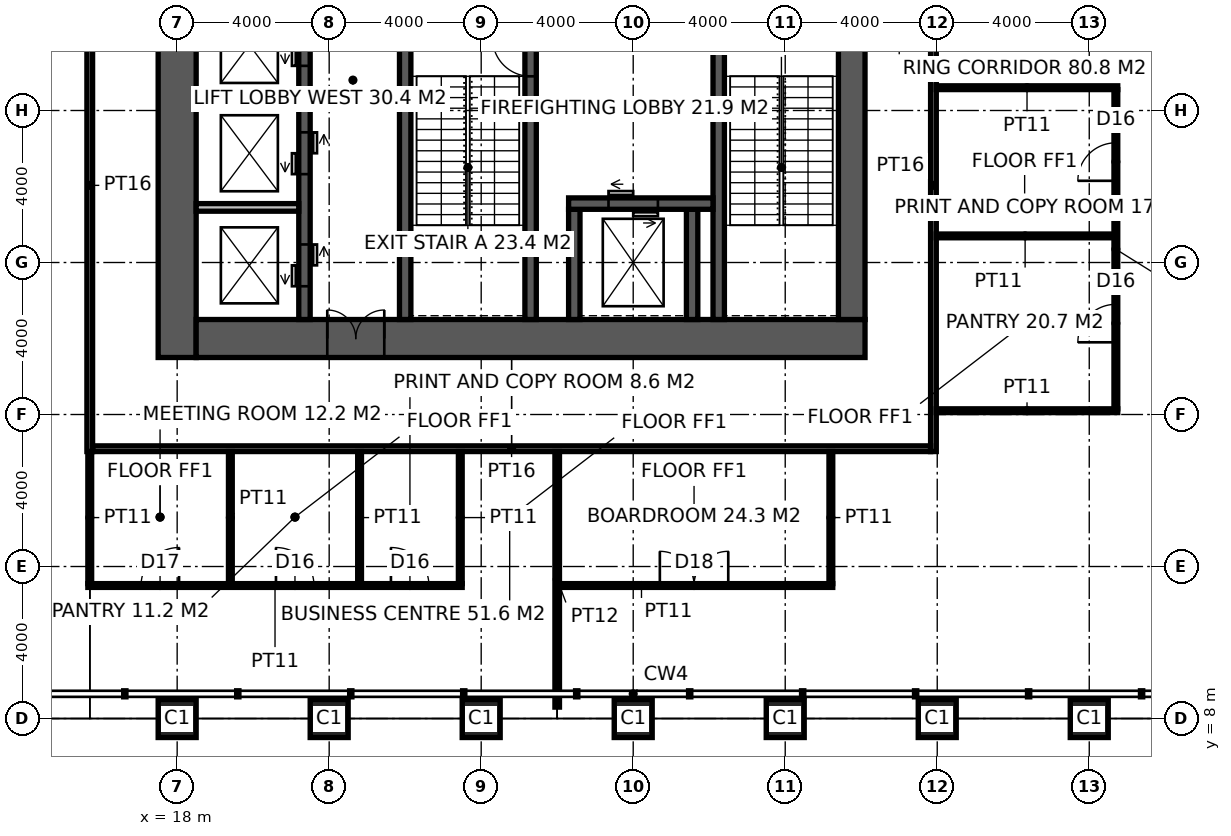
"""IFC4 building model, lengths in metres.
Left out: names, types, materials, properties, quantities, classifications, styles, units other than length and angle.
Written with IfcOpenShell. Run it as: python <this file> out.ifc"""

import sys

from ifc_helpers import new_model, si_unit, direction, frame, frame_2d, origin, origin_2d, place, context, subcontext, project, spatial, rectangle, hollow_rectangle, extrude, element, fill, save


model = new_model("IFC4")
c1 = context("Model", 3, precision=1e-05, world=origin(), true_north=direction((0.0, 1.0)))
c2 = subcontext(c1, "Body", "Model", "MODEL_VIEW")
j1 = project(units=[si_unit("LENGTHUNIT", "METRE"), si_unit("PLANEANGLEUNIT", "RADIAN")], contexts=[c1])
p1 = place(None, origin())
s1 = spatial("IfcSite", under=j1, at=p1, CompositionType="ELEMENT")
p2 = place(p1, origin())
s2 = spatial("IfcBuilding", under=s1, at=p2, CompositionType="ELEMENT")
p3 = place(p2, frame((0.0, 0.0, 209.2)))
s3 = spatial("IfcBuildingStorey", under=s2, at=p3, CompositionType="ELEMENT", Elevation=209.2)
for number, where, z_axis, x_axis in (
    (1, (18.0, 8.0, 0.0), (0.0, 0.0, 1.0), (1.0, 0.0, 0.0)),
    (2, (22.0, 8.0, 0.0), (0.0, 0.0, 1.0), (1.0, 0.0, 0.0)),
    (3, (26.0, 8.0, 0.0), (0.0, 0.0, 1.0), (1.0, 0.0, 0.0)),
    (4, (30.0, 8.0, 0.0), (0.0, 0.0, 1.0), (1.0, 0.0, 0.0)),
    (5, (34.0, 8.0, 0.0), (0.0, 0.0, 1.0), (1.0, 0.0, 0.0)),
    (6, (38.0, 8.0, 0.0), (0.0, 0.0, 1.0), (1.0, 0.0, 0.0)),
    (7, (42.0, 8.0, 0.0), (0.0, 0.0, 1.0), (1.0, 0.0, 0.0)),
):
    element("IfcColumn", number, at=place(p3, frame(where, z_axis=z_axis, x_axis=x_axis)), inside=s3, PredefinedType="COLUMN", context=c2, shape_type="SweptSolid", body=[
        extrude(hollow_rectangle(XDim=1.0, YDim=1.0, WallThickness=0.1, at=origin_2d()), origin(), (0.0, 0.0, 1.0), 5.0),
    ])
p4 = place(p3, frame((18.0, 17.5, -0.15), z_axis=(0.0, 0.0, 1.0), x_axis=(0.0, 1.0, 0.0)))
e8 = element("IfcWall", 8, at=p4, inside=s3, PredefinedType="SHEAR", context=c2, shape_type="SweptSolid", body=[
    extrude(rectangle(XDim=19.0, YDim=1.0, at=frame_2d((9.5, 0.0))), origin(), (0.0, 0.0, 1.0), 5.0),
])
p5 = place(p3, frame((18.5, 18.0, -0.15), z_axis=(0.0, 0.0, 1.0), x_axis=(1.0, 0.0, 0.0)))
e9 = element("IfcWall", 9, at=p5, inside=s3, PredefinedType="SHEAR", context=c2, shape_type="SweptSolid", body=[
    extrude(rectangle(XDim=17.6, YDim=1.0, at=frame_2d((8.8, 0.0))), origin(), (0.0, 0.0, 1.0), 5.0),
])
p6 = place(p5, frame((3.45, 0.0, 0.15)))
e10 = element("IfcOpeningElement", 10, at=p6, cuts=e9, PredefinedType="OPENING", context=c2, shape_type="SweptSolid", body=[
    extrude(rectangle(XDim=1.5, YDim=2.4, at=frame_2d((0.75, 1.2))), frame((0.0, 0.51, 0.0), z_axis=(0.0, -1.0, 0.0), x_axis=(1.0, 0.0, 0.0)), (0.0, 0.0, 1.0), 1.02),
])
p7 = place(p3, frame((35.75, 18.5, -0.15), z_axis=(0.0, 0.0, 1.0), x_axis=(0.0, 1.0, 0.0)))
e11 = element("IfcWall", 11, at=p7, inside=s3, PredefinedType="SHEAR", context=c2, shape_type="SweptSolid", body=[
    extrude(rectangle(XDim=17.0, YDim=0.7, at=frame_2d((8.5, 0.0))), origin(), (0.0, 0.0, 1.0), 5.0),
])
p8 = place(p7, frame((9.85, 0.0, 0.15)))
e12 = element("IfcOpeningElement", 12, at=p8, cuts=e11, PredefinedType="OPENING", context=c2, shape_type="SweptSolid", body=[
    extrude(rectangle(XDim=1.0, YDim=2.2, at=frame_2d((0.5, 1.1))), frame((0.0, 0.36, 0.0), z_axis=(0.0, -1.0, 0.0), x_axis=(1.0, 0.0, 0.0)), (0.0, 0.0, 1.0), 0.72),
])
p9 = place(p3, frame((24.0, 18.5, -0.15), z_axis=(0.0, 0.0, 1.0), x_axis=(0.0, 1.0, 0.0)))
e13 = element("IfcWall", 13, at=p9, inside=s3, PredefinedType="SHEAR", context=c2, shape_type="SweptSolid", body=[
    extrude(rectangle(XDim=17.0, YDim=0.3, at=frame_2d((8.5, 0.0))), origin(), (0.0, 0.0, 1.0), 5.0),
])
p10 = place(p9, frame((9.6, 0.0, 0.15)))
e14 = element("IfcOpeningElement", 14, at=p10, cuts=e13, PredefinedType="OPENING", context=c2, shape_type="SweptSolid", body=[
    extrude(rectangle(XDim=1.5, YDim=2.4, at=frame_2d((0.75, 1.2))), frame((0.0, 0.16, 0.0), z_axis=(0.0, -1.0, 0.0), x_axis=(1.0, 0.0, 0.0)), (0.0, 0.0, 1.0), 0.32),
])
p11 = place(p3, frame((27.3, 18.5, -0.15), z_axis=(0.0, 0.0, 1.0), x_axis=(0.0, 1.0, 0.0)))
e15 = element("IfcWall", 15, at=p11, inside=s3, PredefinedType="SHEAR", context=c2, shape_type="SweptSolid", body=[
    extrude(rectangle(XDim=7.9, YDim=0.3, at=frame_2d((3.95, 0.0))), origin(), (0.0, 0.0, 1.0), 5.0),
])
p12 = place(p11, frame((6.4, 0.0, 0.15)))
e16 = element("IfcOpeningElement", 16, at=p12, cuts=e15, PredefinedType="OPENING", context=c2, shape_type="SweptSolid", body=[
    extrude(rectangle(XDim=1.0, YDim=2.2, at=frame_2d((0.5, 1.1))), frame((0.0, 0.16, 0.0), z_axis=(0.0, -1.0, 0.0), x_axis=(1.0, 0.0, 0.0)), (0.0, 0.0, 1.0), 0.32),
])
p13 = place(p3, frame((32.25, 18.5, -0.15), z_axis=(0.0, 0.0, 1.0), x_axis=(0.0, 1.0, 0.0)))
e17 = element("IfcWall", 17, at=p13, inside=s3, PredefinedType="SHEAR", context=c2, shape_type="SweptSolid", body=[
    extrude(rectangle(XDim=7.9, YDim=0.3, at=frame_2d((3.95, 0.0))), origin(), (0.0, 0.0, 1.0), 5.0),
])
for number, where, z_axis, x_axis in (
    (18, (28.45, 18.5, -0.15), (0.0, 0.0, 1.0), (0.0, 1.0, 0.0)),
    (19, (31.55, 18.5, -0.15), (0.0, 0.0, 1.0), (0.0, 1.0, 0.0)),
):
    element("IfcWall", number, at=place(p3, frame(where, z_axis=z_axis, x_axis=x_axis)), inside=s3, PredefinedType="SHEAR", context=c2, shape_type="SweptSolid", body=[
        extrude(rectangle(XDim=2.9, YDim=0.3, at=frame_2d((1.45, 0.0))), origin(), (0.0, 0.0, 1.0), 5.0),
    ])
p14 = place(p3, frame((28.3, 21.55, -0.15), z_axis=(0.0, 0.0, 1.0), x_axis=(1.0, 0.0, 0.0)))
e20 = element("IfcWall", 20, at=p14, inside=s3, PredefinedType="SHEAR", context=c2, shape_type="SweptSolid", body=[
    extrude(rectangle(XDim=3.8, YDim=0.3, at=frame_2d((1.9, 0.0))), origin(), (0.0, 0.0, 1.0), 5.0),
])
p15 = place(p14, frame((1.05, 0.0, 0.15)))
e21 = element("IfcOpeningElement", 21, at=p15, cuts=e20, PredefinedType="OPENING", context=c2, shape_type="SweptSolid", body=[
    extrude(rectangle(XDim=1.3, YDim=2.4, at=frame_2d((0.65, 1.2))), frame((0.0, 0.16, 0.0), z_axis=(0.0, -1.0, 0.0), x_axis=(1.0, 0.0, 0.0)), (0.0, 0.0, 1.0), 0.32),
])
p16 = place(p3, frame((21.35, 18.5, -0.15), z_axis=(0.0, 0.0, 1.0), x_axis=(0.0, 1.0, 0.0)))
e22 = element("IfcWall", 22, at=p16, inside=s3, PredefinedType="SHEAR", context=c2, shape_type="SweptSolid", body=[
    extrude(rectangle(XDim=12.5, YDim=0.3, at=frame_2d((6.25, 0.0))), origin(), (0.0, 0.0, 1.0), 5.0),
])
p17 = place(p16, frame((0.875, 0.0, 0.15)))
e23 = element("IfcOpeningElement", 23, at=p17, cuts=e22, PredefinedType="OPENING", context=c2, shape_type="SweptSolid", body=[
    extrude(rectangle(XDim=1.1, YDim=2.2, at=frame_2d((0.55, 1.1))), frame((0.0, 0.16, 0.0), z_axis=(0.0, -1.0, 0.0), x_axis=(1.0, 0.0, 0.0)), (0.0, 0.0, 1.0), 0.32),
])
p18 = place(p16, frame((3.825, 0.0, 0.15)))
e24 = element("IfcOpeningElement", 24, at=p18, cuts=e22, PredefinedType="OPENING", context=c2, shape_type="SweptSolid", body=[
    extrude(rectangle(XDim=1.1, YDim=2.2, at=frame_2d((0.55, 1.1))), frame((0.0, 0.16, 0.0), z_axis=(0.0, -1.0, 0.0), x_axis=(1.0, 0.0, 0.0)), (0.0, 0.0, 1.0), 0.32),
])
p19 = place(p16, frame((6.675, 0.0, 0.15)))
e25 = element("IfcOpeningElement", 25, at=p19, cuts=e22, PredefinedType="OPENING", context=c2, shape_type="SweptSolid", body=[
    extrude(rectangle(XDim=1.1, YDim=2.2, at=frame_2d((0.55, 1.1))), frame((0.0, 0.16, 0.0), z_axis=(0.0, -1.0, 0.0), x_axis=(1.0, 0.0, 0.0)), (0.0, 0.0, 1.0), 0.32),
])
p20 = place(p16, frame((9.575, 0.0, 0.15)))
e26 = element("IfcOpeningElement", 26, at=p20, cuts=e22, PredefinedType="OPENING", context=c2, shape_type="SweptSolid", body=[
    extrude(rectangle(XDim=1.1, YDim=2.2, at=frame_2d((0.55, 1.1))), frame((0.0, 0.16, 0.0), z_axis=(0.0, -1.0, 0.0), x_axis=(1.0, 0.0, 0.0)), (0.0, 0.0, 1.0), 0.32),
])
for number, where, z_axis, x_axis in (
    (27, (18.5, 21.45, -0.15), (0.0, 0.0, 1.0), (1.0, 0.0, 0.0)),
    (28, (18.5, 24.3, -0.15), (0.0, 0.0, 1.0), (1.0, 0.0, 0.0)),
):
    element("IfcWall", number, at=place(p3, frame(where, z_axis=z_axis, x_axis=x_axis)), inside=s3, PredefinedType="SOLIDWALL", context=c2, shape_type="SweptSolid", body=[
        extrude(rectangle(XDim=2.7, YDim=0.2, at=frame_2d((1.35, 0.0))), origin(), (0.0, 0.0, 1.0), 5.0),
    ])
p21 = place(p3, frame((15.7, 15.025, 0.0), z_axis=(0.0, 0.0, 1.0), x_axis=(0.0, 1.0, 0.0)))
e29 = element("IfcWall", 29, at=p21, inside=s3, PredefinedType="PARTITIONING", context=c2, shape_type="SweptSolid", body=[
    extrude(rectangle(XDim=23.35, YDim=0.15, at=frame_2d((11.675, 0.0))), origin(), (0.0, 0.0, 1.0), 4.85),
])
p22 = place(p21, frame((10.875, 0.0, 0.0)))
e30 = element("IfcOpeningElement", 30, at=p22, cuts=e29, PredefinedType="OPENING", context=c2, shape_type="SweptSolid", body=[
    extrude(rectangle(XDim=1.6, YDim=2.7, at=frame_2d((0.8, 1.35))), frame((0.0, 0.085, 0.0), z_axis=(0.0, -1.0, 0.0), x_axis=(1.0, 0.0, 0.0)), (0.0, 0.0, 1.0), 0.17),
])
p23 = place(p3, frame((37.9, 15.025, 0.0), z_axis=(0.0, 0.0, 1.0), x_axis=(0.0, 1.0, 0.0)))
e31 = element("IfcWall", 31, at=p23, inside=s3, PredefinedType="PARTITIONING", context=c2, shape_type="SweptSolid", body=[
    extrude(rectangle(XDim=23.35, YDim=0.15, at=frame_2d((11.675, 0.0))), origin(), (0.0, 0.0, 1.0), 3.95),
])
p24 = place(p23, frame((10.775, 0.0, 0.0)))
e32 = element("IfcOpeningElement", 32, at=p24, cuts=e31, PredefinedType="OPENING", context=c2, shape_type="SweptSolid", body=[
    extrude(rectangle(XDim=1.8, YDim=2.4, at=frame_2d((0.9, 1.2))), frame((0.0, 0.085, 0.0), z_axis=(0.0, -1.0, 0.0), x_axis=(1.0, 0.0, 0.0)), (0.0, 0.0, 1.0), 0.17),
])
p25 = place(p3, frame((15.775, 15.1, 0.0), z_axis=(0.0, 0.0, 1.0), x_axis=(1.0, 0.0, 0.0)))
e33 = element("IfcWall", 33, at=p25, inside=s3, PredefinedType="PARTITIONING", context=c2, shape_type="SweptSolid", body=[
    extrude(rectangle(XDim=22.05, YDim=0.15, at=frame_2d((11.025, 0.0))), origin(), (0.0, 0.0, 1.0), 4.85),
])
p26 = place(p3, frame((28.0, 8.3, 0.0), z_axis=(0.0, 0.0, 1.0), x_axis=(0.0, 1.0, 0.0)))
e34 = element("IfcWall", 34, at=p26, inside=s3, PredefinedType="PARTITIONING", context=c2, shape_type="SweptSolid", body=[
    extrude(rectangle(XDim=6.725, YDim=0.12, at=frame_2d((3.362, 0.0))), origin(), (0.0, 0.0, 1.0), 4.85),
])
p27 = place(p3, frame((15.65, 11.5, 0.0), z_axis=(0.0, 0.0, 1.0), x_axis=(1.0, 0.0, 0.0)))
e35 = element("IfcWall", 35, at=p27, inside=s3, PredefinedType="PARTITIONING", context=c2, shape_type="SweptSolid", body=[
    extrude(rectangle(XDim=9.85, YDim=0.1, at=frame_2d((4.925, 0.0))), origin(), (0.0, 0.0, 1.0), 4.85),
])
p28 = place(p27, frame((1.4, 0.0, 0.0)))
e36 = element("IfcOpeningElement", 36, at=p28, cuts=e35, PredefinedType="OPENING", context=c2, shape_type="SweptSolid", body=[
    extrude(rectangle(XDim=1.0, YDim=2.2, at=frame_2d((0.5, 1.1))), frame((0.0, 0.06, 0.0), z_axis=(0.0, -1.0, 0.0), x_axis=(1.0, 0.0, 0.0)), (0.0, 0.0, 1.0), 0.12),
])
p29 = place(p27, frame((4.95, 0.0, 0.0)))
e37 = element("IfcOpeningElement", 37, at=p29, cuts=e35, PredefinedType="OPENING", context=c2, shape_type="SweptSolid", body=[
    extrude(rectangle(XDim=1.0, YDim=2.2, at=frame_2d((0.5, 1.1))), frame((0.0, 0.06, 0.0), z_axis=(0.0, -1.0, 0.0), x_axis=(1.0, 0.0, 0.0)), (0.0, 0.0, 1.0), 0.12),
])
p30 = place(p27, frame((7.975, 0.0, 0.0)))
e38 = element("IfcOpeningElement", 38, at=p30, cuts=e35, PredefinedType="OPENING", context=c2, shape_type="SweptSolid", body=[
    extrude(rectangle(XDim=1.0, YDim=2.2, at=frame_2d((0.5, 1.1))), frame((0.0, 0.06, 0.0), z_axis=(0.0, -1.0, 0.0), x_axis=(1.0, 0.0, 0.0)), (0.0, 0.0, 1.0), 0.12),
])
p31 = place(p3, frame((28.061, 11.5, 0.0), z_axis=(0.0, 0.0, 1.0), x_axis=(1.0, 0.0, 0.0)))
e39 = element("IfcWall", 39, at=p31, inside=s3, PredefinedType="PARTITIONING", context=c2, shape_type="SweptSolid", body=[
    extrude(rectangle(XDim=7.19, YDim=0.1, at=frame_2d((3.595, 0.0))), origin(), (0.0, 0.0, 1.0), 4.85),
])
p32 = place(p31, frame((2.64, 0.0, 0.0)))
e40 = element("IfcOpeningElement", 40, at=p32, cuts=e39, PredefinedType="OPENING", context=c2, shape_type="SweptSolid", body=[
    extrude(rectangle(XDim=1.8, YDim=2.4, at=frame_2d((0.9, 1.2))), frame((0.0, 0.06, 0.0), z_axis=(0.0, -1.0, 0.0), x_axis=(1.0, 0.0, 0.0)), (0.0, 0.0, 1.0), 0.12),
])
p33 = place(p3, frame((37.975, 16.1, 0.0), z_axis=(0.0, 0.0, 1.0), x_axis=(1.0, 0.0, 0.0)))
e41 = element("IfcWall", 41, at=p33, inside=s3, PredefinedType="PARTITIONING", context=c2, shape_type="SweptSolid", body=[
    extrude(rectangle(XDim=4.775, YDim=0.1, at=frame_2d((2.387, 0.0))), origin(), (0.0, 0.0, 1.0), 4.85),
])
p34 = place(p3, frame((37.975, 20.7, 0.0), z_axis=(0.0, 0.0, 1.0), x_axis=(1.0, 0.0, 0.0)))
e42 = element("IfcWall", 42, at=p34, inside=s3, PredefinedType="PARTITIONING", context=c2, shape_type="SweptSolid", body=[
    extrude(rectangle(XDim=4.675, YDim=0.1, at=frame_2d((2.337, 0.0))), origin(), (0.0, 0.0, 1.0), 4.85),
])
p35 = place(p3, frame((37.975, 24.6, 0.0), z_axis=(0.0, 0.0, 1.0), x_axis=(1.0, 0.0, 0.0)))
e43 = element("IfcWall", 43, at=p35, inside=s3, PredefinedType="PARTITIONING", context=c2, shape_type="SweptSolid", body=[
    extrude(rectangle(XDim=4.775, YDim=0.1, at=frame_2d((2.387, 0.0))), origin(), (0.0, 0.0, 1.0), 4.85),
])
for number, where, z_axis, x_axis in (
    (44, (15.7, 11.55, 0.0), (0.0, 0.0, 1.0), (0.0, 1.0, 0.0)),
    (45, (19.4, 11.55, 0.0), (0.0, 0.0, 1.0), (0.0, 1.0, 0.0)),
    (46, (22.8, 11.55, 0.0), (0.0, 0.0, 1.0), (0.0, 1.0, 0.0)),
    (47, (25.45, 11.55, 0.0), (0.0, 0.0, 1.0), (0.0, 1.0, 0.0)),
    (48, (35.201, 11.55, 0.0), (0.0, 0.0, 1.0), (0.0, 1.0, 0.0)),
):
    element("IfcWall", number, at=place(p3, frame(where, z_axis=z_axis, x_axis=x_axis)), inside=s3, PredefinedType="PARTITIONING", context=c2, shape_type="SweptSolid", body=[
        extrude(rectangle(XDim=3.475, YDim=0.1, at=frame_2d((1.737, 0.0))), origin(), (0.0, 0.0, 1.0), 4.85),
    ])
p36 = place(p3, frame((42.7, 16.15, 0.0), z_axis=(0.0, 0.0, 1.0), x_axis=(0.0, 1.0, 0.0)))
e49 = element("IfcWall", 49, at=p36, inside=s3, PredefinedType="PARTITIONING", context=c2, shape_type="SweptSolid", body=[
    extrude(rectangle(XDim=8.4, YDim=0.1, at=frame_2d((4.2, 0.0))), origin(), (0.0, 0.0, 1.0), 4.85),
])
p37 = place(p36, frame((1.75, 0.0, 0.0)))
e50 = element("IfcOpeningElement", 50, at=p37, cuts=e49, PredefinedType="OPENING", context=c2, shape_type="SweptSolid", body=[
    extrude(rectangle(XDim=1.0, YDim=2.2, at=frame_2d((0.5, 1.1))), frame((0.0, 0.06, 0.0), z_axis=(0.0, -1.0, 0.0), x_axis=(1.0, 0.0, 0.0)), (0.0, 0.0, 1.0), 0.12),
])
p38 = place(p36, frame((6.0, 0.0, 0.0)))
e51 = element("IfcOpeningElement", 51, at=p38, cuts=e49, PredefinedType="OPENING", context=c2, shape_type="SweptSolid", body=[
    extrude(rectangle(XDim=1.0, YDim=2.2, at=frame_2d((0.5, 1.1))), frame((0.0, 0.06, 0.0), z_axis=(0.0, -1.0, 0.0), x_axis=(1.0, 0.0, 0.0)), (0.0, 0.0, 1.0), 0.12),
])
p39 = place(p12, origin())
e52 = element("IfcDoor", 52, at=p39, inside=s3, OperationType="SINGLE_SWING_RIGHT", PredefinedType="DOOR", context=c2, shape_type="SweptSolid", body=[
    extrude(rectangle(XDim=1.0, YDim=2.2, at=frame_2d((0.5, 1.1))), frame((0.0, 0.025, 0.0), z_axis=(0.0, -1.0, 0.0), x_axis=(1.0, 0.0, 0.0)), (0.0, 0.0, 1.0), 0.05),
])
fill(e16, e52)
p40 = place(p6, origin())
e53 = element("IfcDoor", 53, at=p40, inside=s3, OperationType="DOUBLE_DOOR_DOUBLE_SWING", PredefinedType="DOOR", context=c2, shape_type="SweptSolid", body=[
    extrude(rectangle(XDim=1.5, YDim=2.4, at=frame_2d((0.75, 1.2))), frame((0.0, 0.025, 0.0), z_axis=(0.0, -1.0, 0.0), x_axis=(1.0, 0.0, 0.0)), (0.0, 0.0, 1.0), 0.05),
])
fill(e10, e53)
p41 = place(p28, origin())
e54 = element("IfcDoor", 54, at=p41, inside=s3, OperationType="SINGLE_SWING_RIGHT", PredefinedType="DOOR", context=c2, shape_type="SweptSolid", body=[
    extrude(rectangle(XDim=1.0, YDim=2.2, at=frame_2d((0.5, 1.1))), frame((0.0, 0.025, 0.0), z_axis=(0.0, -1.0, 0.0), x_axis=(1.0, 0.0, 0.0)), (0.0, 0.0, 1.0), 0.05),
])
fill(e36, e54)
p42 = place(p29, origin())
e55 = element("IfcDoor", 55, at=p42, inside=s3, OperationType="SINGLE_SWING_LEFT", PredefinedType="DOOR", context=c2, shape_type="SweptSolid", body=[
    extrude(rectangle(XDim=1.0, YDim=2.2, at=frame_2d((0.5, 1.1))), frame((0.0, 0.025, 0.0), z_axis=(0.0, -1.0, 0.0), x_axis=(1.0, 0.0, 0.0)), (0.0, 0.0, 1.0), 0.05),
])
fill(e37, e55)
p43 = place(p30, origin())
e56 = element("IfcDoor", 56, at=p43, inside=s3, OperationType="SINGLE_SWING_LEFT", PredefinedType="DOOR", context=c2, shape_type="SweptSolid", body=[
    extrude(rectangle(XDim=1.0, YDim=2.2, at=frame_2d((0.5, 1.1))), frame((0.0, 0.025, 0.0), z_axis=(0.0, -1.0, 0.0), x_axis=(1.0, 0.0, 0.0)), (0.0, 0.0, 1.0), 0.05),
])
fill(e38, e56)
p44 = place(p32, origin())
e57 = element("IfcDoor", 57, at=p44, inside=s3, OperationType="DOUBLE_DOOR_DOUBLE_SWING", PredefinedType="DOOR", context=c2, shape_type="SweptSolid", body=[
    extrude(rectangle(XDim=1.8, YDim=2.4, at=frame_2d((0.9, 1.2))), frame((0.0, 0.025, 0.0), z_axis=(0.0, -1.0, 0.0), x_axis=(1.0, 0.0, 0.0)), (0.0, 0.0, 1.0), 0.05),
])
fill(e40, e57)
p45 = place(p37, origin())
e58 = element("IfcDoor", 58, at=p45, inside=s3, OperationType="SINGLE_SWING_LEFT", PredefinedType="DOOR", context=c2, shape_type="SweptSolid", body=[
    extrude(rectangle(XDim=1.0, YDim=2.2, at=frame_2d((0.5, 1.1))), frame((0.0, 0.025, 0.0), z_axis=(0.0, -1.0, 0.0), x_axis=(1.0, 0.0, 0.0)), (0.0, 0.0, 1.0), 0.05),
])
fill(e50, e58)
p46 = place(p38, origin())
e59 = element("IfcDoor", 59, at=p46, inside=s3, OperationType="SINGLE_SWING_LEFT", PredefinedType="DOOR", context=c2, shape_type="SweptSolid", body=[
    extrude(rectangle(XDim=1.0, YDim=2.2, at=frame_2d((0.5, 1.1))), frame((0.0, 0.025, 0.0), z_axis=(0.0, -1.0, 0.0), x_axis=(1.0, 0.0, 0.0)), (0.0, 0.0, 1.0), 0.05),
])
fill(e51, e59)
p47 = place(p15, origin())
e60 = element("IfcDoor", 60, at=p47, inside=s3, OperationType="DOUBLE_DOOR_SLIDING", PredefinedType="DOOR", context=c2, shape_type="SweptSolid", body=[
    extrude(rectangle(XDim=1.3, YDim=2.4, at=frame_2d((0.65, 1.2))), frame((0.0, 0.025, 0.0), z_axis=(0.0, -1.0, 0.0), x_axis=(1.0, 0.0, 0.0)), (0.0, 0.0, 1.0), 0.05),
])
fill(e21, e60)
p48 = place(p17, origin())
e61 = element("IfcDoor", 61, at=p48, inside=s3, OperationType="DOUBLE_DOOR_SLIDING", PredefinedType="DOOR", context=c2, shape_type="SweptSolid", body=[
    extrude(rectangle(XDim=1.1, YDim=2.2, at=frame_2d((0.55, 1.1))), frame((0.0, 0.025, 0.0), z_axis=(0.0, -1.0, 0.0), x_axis=(1.0, 0.0, 0.0)), (0.0, 0.0, 1.0), 0.05),
])
fill(e23, e61)
p49 = place(p18, origin())
e62 = element("IfcDoor", 62, at=p49, inside=s3, OperationType="DOUBLE_DOOR_SLIDING", PredefinedType="DOOR", context=c2, shape_type="SweptSolid", body=[
    extrude(rectangle(XDim=1.1, YDim=2.2, at=frame_2d((0.55, 1.1))), frame((0.0, 0.025, 0.0), z_axis=(0.0, -1.0, 0.0), x_axis=(1.0, 0.0, 0.0)), (0.0, 0.0, 1.0), 0.05),
])
fill(e24, e62)
p50 = place(p19, origin())
e63 = element("IfcDoor", 63, at=p50, inside=s3, OperationType="DOUBLE_DOOR_SLIDING", PredefinedType="DOOR", context=c2, shape_type="SweptSolid", body=[
    extrude(rectangle(XDim=1.1, YDim=2.2, at=frame_2d((0.55, 1.1))), frame((0.0, 0.025, 0.0), z_axis=(0.0, -1.0, 0.0), x_axis=(1.0, 0.0, 0.0)), (0.0, 0.0, 1.0), 0.05),
])
fill(e25, e63)
save(model, sys.argv[1])
